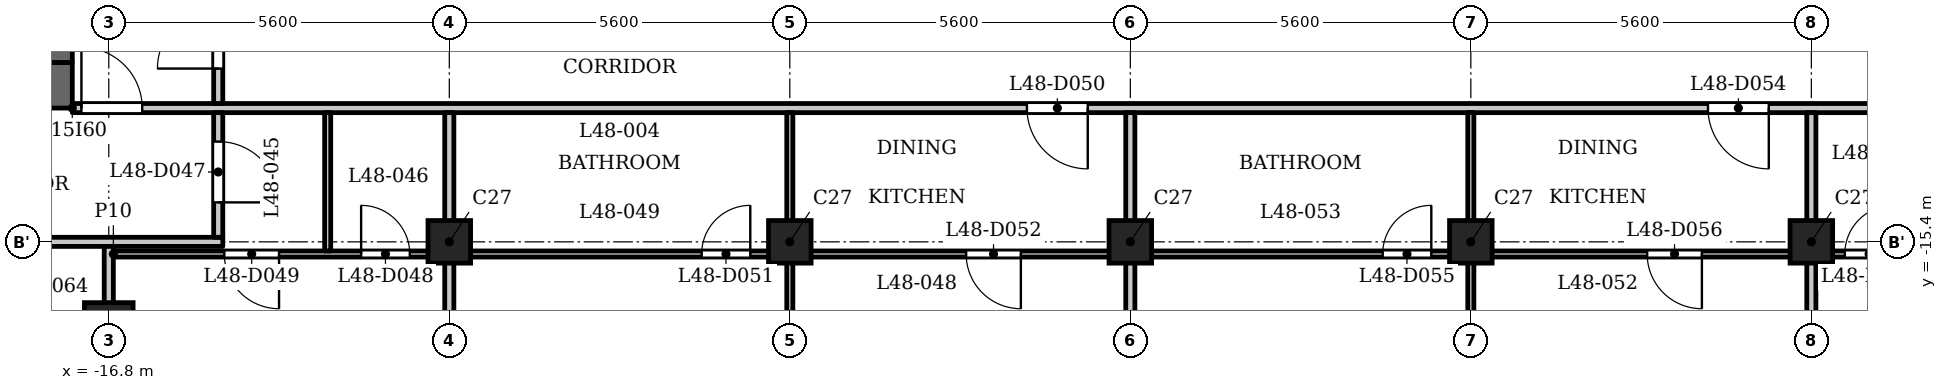
"""IFC4 building model, lengths in metres.
Left out: names, types, materials, properties, quantities, classifications, styles, units other than length and angle.
Written with IfcOpenShell. Run it as: python <this file> out.ifc"""

import sys

from ifc_helpers import new_model, si_unit, direction, frame, frame_2d, origin, origin_2d, place, context, subcontext, project, spatial, rectangle, extrude, element, fill, save


model = new_model("IFC4")
c1 = context("Model", 3, precision=1e-05, world=origin(), true_north=direction((0.0, 1.0)))
c2 = subcontext(c1, "Body", "Model", "MODEL_VIEW")
j1 = project(units=[si_unit("LENGTHUNIT", "METRE"), si_unit("PLANEANGLEUNIT", "RADIAN")], contexts=[c1])
p1 = place(None, origin())
s1 = spatial("IfcSite", under=j1, at=p1, CompositionType="ELEMENT")
p2 = place(p1, origin())
s2 = spatial("IfcBuilding", under=s1, at=p2, CompositionType="ELEMENT")
p3 = place(p2, frame((0.0, 0.0, 188.9)))
s3 = spatial("IfcBuildingStorey", under=s2, at=p3, CompositionType="ELEMENT", Elevation=188.9)
p4 = place(p3, frame((-16.8, -16.8, 0.0), z_axis=(0.0, 0.0, 1.0), x_axis=(1.0, 0.0, 0.0)))
e1 = element("IfcColumn", 1, at=p4, inside=s3, PredefinedType="COLUMN", context=c2, shape_type="SweptSolid", body=[
    extrude(rectangle(XDim=0.8, YDim=0.8, at=origin_2d()), origin(), (0.0, 0.0, 1.0), 3.5),
])
for number, where, z_axis, x_axis in (
    (2, (-11.2, -15.4, 0.0), (0.0, 0.0, 1.0), (1.0, 0.0, 0.0)),
    (3, (-5.6, -15.4, 0.0), (0.0, 0.0, 1.0), (1.0, 0.0, 0.0)),
    (4, (0.0, -15.4, 0.0), (0.0, 0.0, 1.0), (1.0, 0.0, 0.0)),
    (5, (5.6, -15.4, 0.0), (0.0, 0.0, 1.0), (1.0, 0.0, 0.0)),
    (6, (11.2, -15.4, 0.0), (0.0, 0.0, 1.0), (1.0, 0.0, 0.0)),
):
    element("IfcColumn", number, at=place(p3, frame(where, z_axis=z_axis, x_axis=x_axis)), inside=s3, PredefinedType="COLUMN", context=c2, shape_type="SweptSolid", body=[
        extrude(rectangle(XDim=0.7, YDim=0.7, at=origin_2d()), origin(), (0.0, 0.0, 1.0), 3.5),
    ])
p5 = place(p3, frame((-17.4, -12.825, 0.0), z_axis=(0.0, 0.0, 1.0), x_axis=(-1.0, 0.0, 0.0)))
e7 = element("IfcWall", 7, at=p5, inside=s3, PredefinedType="SHEAR", context=c2, shape_type="SweptSolid", body=[
    extrude(rectangle(XDim=7.6, YDim=0.75, at=frame_2d((3.8, 0.0))), origin(), (0.0, 0.0, 1.0), 3.2),
])
p6 = place(p3, frame((-17.6, -12.45, 0.0), z_axis=(0.0, 0.0, 1.0), x_axis=(0.0, 1.0, 0.0)))
e8 = element("IfcWall", 8, at=p6, inside=s3, PredefinedType="SHEAR", context=c2, shape_type="SweptSolid", body=[
    extrude(rectangle(XDim=24.9, YDim=0.4, at=frame_2d((12.45, 0.0))), origin(), (0.0, 0.0, 1.0), 3.2),
])
p7 = place(p6, frame((6.325, 0.0, 0.0)))
e9 = element("IfcOpeningElement", 9, at=p7, cuts=e8, PredefinedType="OPENING", context=c2, shape_type="SweptSolid", body=[
    extrude(rectangle(XDim=0.9, YDim=2.1, at=frame_2d((0.45, 1.05))), frame((0.0, 0.21, 0.0), z_axis=(0.0, -1.0, 0.0), x_axis=(1.0, 0.0, 0.0)), (0.0, 0.0, 1.0), 0.42),
])
p8 = place(p6, frame((9.925, 0.0, 0.0)))
e10 = element("IfcOpeningElement", 10, at=p8, cuts=e8, PredefinedType="OPENING", context=c2, shape_type="SweptSolid", body=[
    extrude(rectangle(XDim=0.9, YDim=2.1, at=frame_2d((0.45, 1.05))), frame((0.0, 0.21, 0.0), z_axis=(0.0, -1.0, 0.0), x_axis=(1.0, 0.0, 0.0)), (0.0, 0.0, 1.0), 0.42),
])
p9 = place(p6, frame((15.6, 0.0, 0.0)))
e11 = element("IfcOpeningElement", 11, at=p9, cuts=e8, PredefinedType="OPENING", context=c2, shape_type="SweptSolid", body=[
    extrude(rectangle(XDim=1.1, YDim=2.1, at=frame_2d((0.55, 1.05))), frame((0.0, 0.21, 0.0), z_axis=(0.0, -1.0, 0.0), x_axis=(1.0, 0.0, 0.0)), (0.0, 0.0, 1.0), 0.42),
])
p10 = place(p6, frame((18.0, 0.0, 0.0)))
e12 = element("IfcOpeningElement", 12, at=p10, cuts=e8, PredefinedType="OPENING", context=c2, shape_type="SweptSolid", body=[
    extrude(rectangle(XDim=1.1, YDim=2.1, at=frame_2d((0.55, 1.05))), frame((0.0, 0.21, 0.0), z_axis=(0.0, -1.0, 0.0), x_axis=(1.0, 0.0, 0.0)), (0.0, 0.0, 1.0), 0.42),
])
p11 = place(p6, frame((23.025, 0.0, 0.0)))
e13 = element("IfcOpeningElement", 13, at=p11, cuts=e8, PredefinedType="OPENING", context=c2, shape_type="SweptSolid", body=[
    extrude(rectangle(XDim=1.1, YDim=2.1, at=frame_2d((0.55, 1.05))), frame((0.0, 0.21, 0.0), z_axis=(0.0, -1.0, 0.0), x_axis=(1.0, 0.0, 0.0)), (0.0, 0.0, 1.0), 0.42),
])
p12 = place(p6, frame((0.775, 0.0, 0.0)))
e14 = element("IfcOpeningElement", 14, at=p12, cuts=e8, PredefinedType="OPENING", context=c2, shape_type="SweptSolid", body=[
    extrude(rectangle(XDim=1.1, YDim=2.1, at=frame_2d((0.55, 1.05))), frame((0.0, 0.21, 0.0), z_axis=(0.0, -1.0, 0.0), x_axis=(1.0, 0.0, 0.0)), (0.0, 0.0, 1.0), 0.42),
])
p13 = place(p6, frame((12.925, 0.0, 0.0)))
e15 = element("IfcOpeningElement", 15, at=p13, cuts=e8, PredefinedType="OPENING", context=c2, shape_type="SweptSolid", body=[
    extrude(rectangle(XDim=1.8, YDim=2.1, at=frame_2d((0.9, 1.05))), frame((0.0, 0.21, 0.0), z_axis=(0.0, -1.0, 0.0), x_axis=(1.0, 0.0, 0.0)), (0.0, 0.0, 1.0), 0.42),
])
p14 = place(p3, frame((-16.725, -15.6, 0.0), z_axis=(0.0, 0.0, 1.0), x_axis=(1.0, 0.0, 0.0)))
e16 = element("IfcWall", 16, at=p14, inside=s3, PredefinedType="PARTITIONING", context=c2, shape_type="SweptSolid", body=[
    extrude(rectangle(XDim=33.45, YDim=0.1, at=frame_2d((16.725, 0.0))), origin(), (0.0, 0.0, 1.0), 3.2),
])
p15 = place(p14, frame((4.075, 0.0, 0.0)))
e17 = element("IfcOpeningElement", 17, at=p15, cuts=e16, PredefinedType="OPENING", context=c2, shape_type="SweptSolid", body=[
    extrude(rectangle(XDim=0.8, YDim=2.1, at=frame_2d((0.4, 1.05))), frame((0.0, 0.06, 0.0), z_axis=(0.0, -1.0, 0.0), x_axis=(1.0, 0.0, 0.0)), (0.0, 0.0, 1.0), 0.12),
])
p16 = place(p14, frame((1.825, 0.0, 0.0)))
e18 = element("IfcOpeningElement", 18, at=p16, cuts=e16, PredefinedType="OPENING", context=c2, shape_type="SweptSolid", body=[
    extrude(rectangle(XDim=0.9, YDim=2.1, at=frame_2d((0.45, 1.05))), frame((0.0, 0.06, 0.0), z_axis=(0.0, -1.0, 0.0), x_axis=(1.0, 0.0, 0.0)), (0.0, 0.0, 1.0), 0.12),
])
p17 = place(p14, frame((9.675, 0.0, 0.0)))
e19 = element("IfcOpeningElement", 19, at=p17, cuts=e16, PredefinedType="OPENING", context=c2, shape_type="SweptSolid", body=[
    extrude(rectangle(XDim=0.8, YDim=2.1, at=frame_2d((0.4, 1.05))), frame((0.0, 0.06, 0.0), z_axis=(0.0, -1.0, 0.0), x_axis=(1.0, 0.0, 0.0)), (0.0, 0.0, 1.0), 0.12),
])
p18 = place(p14, frame((14.025, 0.0, 0.0)))
e20 = element("IfcOpeningElement", 20, at=p18, cuts=e16, PredefinedType="OPENING", context=c2, shape_type="SweptSolid", body=[
    extrude(rectangle(XDim=0.9, YDim=2.1, at=frame_2d((0.45, 1.05))), frame((0.0, 0.06, 0.0), z_axis=(0.0, -1.0, 0.0), x_axis=(1.0, 0.0, 0.0)), (0.0, 0.0, 1.0), 0.12),
])
p19 = place(p14, frame((20.875, 0.0, 0.0)))
e21 = element("IfcOpeningElement", 21, at=p19, cuts=e16, PredefinedType="OPENING", context=c2, shape_type="SweptSolid", body=[
    extrude(rectangle(XDim=0.8, YDim=2.1, at=frame_2d((0.4, 1.05))), frame((0.0, 0.06, 0.0), z_axis=(0.0, -1.0, 0.0), x_axis=(1.0, 0.0, 0.0)), (0.0, 0.0, 1.0), 0.12),
])
p20 = place(p14, frame((25.225, 0.0, 0.0)))
e22 = element("IfcOpeningElement", 22, at=p20, cuts=e16, PredefinedType="OPENING", context=c2, shape_type="SweptSolid", body=[
    extrude(rectangle(XDim=0.9, YDim=2.1, at=frame_2d((0.45, 1.05))), frame((0.0, 0.06, 0.0), z_axis=(0.0, -1.0, 0.0), x_axis=(1.0, 0.0, 0.0)), (0.0, 0.0, 1.0), 0.12),
])
p21 = place(p14, frame((28.475, 0.0, 0.0)))
e23 = element("IfcOpeningElement", 23, at=p21, cuts=e16, PredefinedType="OPENING", context=c2, shape_type="SweptSolid", body=[
    extrude(rectangle(XDim=0.8, YDim=2.1, at=frame_2d((0.4, 1.05))), frame((0.0, 0.06, 0.0), z_axis=(0.0, -1.0, 0.0), x_axis=(1.0, 0.0, 0.0)), (0.0, 0.0, 1.0), 0.12),
])
p22 = place(p14, frame((30.675, 0.0, 0.0)))
e24 = element("IfcOpeningElement", 24, at=p22, cuts=e16, PredefinedType="OPENING", context=c2, shape_type="SweptSolid", body=[
    extrude(rectangle(XDim=0.9, YDim=2.1, at=frame_2d((0.45, 1.05))), frame((0.0, 0.06, 0.0), z_axis=(0.0, -1.0, 0.0), x_axis=(1.0, 0.0, 0.0)), (0.0, 0.0, 1.0), 0.12),
])
p23 = place(p3, frame((-24.684, -15.4, 0.0), z_axis=(0.0, 0.0, 1.0), x_axis=(1.0, 0.0, 0.0)))
e25 = element("IfcWall", 25, at=p23, inside=s3, PredefinedType="PARTITIONING", context=c2, shape_type="SweptSolid", body=[
    extrude(rectangle(XDim=9.759, YDim=0.15, at=frame_2d((4.879, 0.0))), origin(), (0.0, 0.0, 1.0), 3.2),
])
p24 = place(p23, frame((1.143, 0.0, 0.0)))
e26 = element("IfcOpeningElement", 26, at=p24, cuts=e25, PredefinedType="OPENING", context=c2, shape_type="SweptSolid", body=[
    extrude(rectangle(XDim=1.0, YDim=2.1, at=frame_2d((0.5, 1.05))), frame((0.0, 0.085, 0.0), z_axis=(0.0, -1.0, 0.0), x_axis=(1.0, 0.0, 0.0)), (0.0, 0.0, 1.0), 0.17),
])
p25 = place(p3, frame((-17.4, -13.2, 0.0), z_axis=(0.0, 0.0, 1.0), x_axis=(1.0, 0.0, 0.0)))
e27 = element("IfcWall", 27, at=p25, inside=s3, PredefinedType="PARTITIONING", context=c2, shape_type="SweptSolid", body=[
    extrude(rectangle(XDim=34.8, YDim=0.15, at=frame_2d((17.4, 0.0))), origin(), (0.0, 0.0, 1.0), 3.2),
])
p26 = place(p25, frame((0.15, 0.0, 0.0)))
e28 = element("IfcOpeningElement", 28, at=p26, cuts=e27, PredefinedType="OPENING", context=c2, shape_type="SweptSolid", body=[
    extrude(rectangle(XDim=1.0, YDim=2.1, at=frame_2d((0.5, 1.05))), frame((0.0, 0.085, 0.0), z_axis=(0.0, -1.0, 0.0), x_axis=(1.0, 0.0, 0.0)), (0.0, 0.0, 1.0), 0.17),
])
p27 = place(p25, frame((33.55, 0.0, 0.0)))
e29 = element("IfcOpeningElement", 29, at=p27, cuts=e27, PredefinedType="OPENING", context=c2, shape_type="SweptSolid", body=[
    extrude(rectangle(XDim=1.0, YDim=2.1, at=frame_2d((0.5, 1.05))), frame((0.0, 0.085, 0.0), z_axis=(0.0, -1.0, 0.0), x_axis=(1.0, 0.0, 0.0)), (0.0, 0.0, 1.0), 0.17),
])
p28 = place(p25, frame((15.7, 0.0, 0.0)))
e30 = element("IfcOpeningElement", 30, at=p28, cuts=e27, PredefinedType="OPENING", context=c2, shape_type="SweptSolid", body=[
    extrude(rectangle(XDim=1.0, YDim=2.1, at=frame_2d((0.5, 1.05))), frame((0.0, 0.085, 0.0), z_axis=(0.0, -1.0, 0.0), x_axis=(1.0, 0.0, 0.0)), (0.0, 0.0, 1.0), 0.17),
])
p29 = place(p25, frame((26.9, 0.0, 0.0)))
e31 = element("IfcOpeningElement", 31, at=p29, cuts=e27, PredefinedType="OPENING", context=c2, shape_type="SweptSolid", body=[
    extrude(rectangle(XDim=1.0, YDim=2.1, at=frame_2d((0.5, 1.05))), frame((0.0, 0.085, 0.0), z_axis=(0.0, -1.0, 0.0), x_axis=(1.0, 0.0, 0.0)), (0.0, 0.0, 1.0), 0.17),
])
p30 = place(p3, frame((-16.8, -22.31, 0.0), z_axis=(0.0, 0.0, 1.0), x_axis=(0.0, 1.0, 0.0)))
e32 = element("IfcWall", 32, at=p30, inside=s3, PredefinedType="PARTITIONING", context=c2, shape_type="SweptSolid", body=[
    extrude(rectangle(XDim=6.835, YDim=0.15, at=frame_2d((3.417, 0.0))), origin(), (0.0, 0.0, 1.0), 2.55),
])
p31 = place(p3, frame((-15.0, -15.325, 0.0), z_axis=(0.0, 0.0, 1.0), x_axis=(0.0, 1.0, 0.0)))
e33 = element("IfcWall", 33, at=p31, inside=s3, PredefinedType="PARTITIONING", context=c2, shape_type="SweptSolid", body=[
    extrude(rectangle(XDim=2.05, YDim=0.15, at=frame_2d((1.025, 0.0))), origin(), (0.0, 0.0, 1.0), 3.2),
])
p32 = place(p31, frame((0.574, 0.0, 0.0)))
e34 = element("IfcOpeningElement", 34, at=p32, cuts=e33, PredefinedType="OPENING", context=c2, shape_type="SweptSolid", body=[
    extrude(rectangle(XDim=1.0, YDim=2.1, at=frame_2d((0.5, 1.05))), frame((0.0, 0.085, 0.0), z_axis=(0.0, -1.0, 0.0), x_axis=(1.0, 0.0, 0.0)), (0.0, 0.0, 1.0), 0.17),
])
p33 = place(p3, frame((-15.0, -13.125, 0.0), z_axis=(0.0, 0.0, 1.0), x_axis=(0.0, 1.0, 0.0)))
e35 = element("IfcWall", 35, at=p33, inside=s3, PredefinedType="PARTITIONING", context=c2, shape_type="SweptSolid", body=[
    extrude(rectangle(XDim=6.356, YDim=0.15, at=frame_2d((3.178, 0.0))), origin(), (0.0, 0.0, 1.0), 3.2),
])
p34 = place(p33, frame((0.575, 0.0, 0.0)))
e36 = element("IfcOpeningElement", 36, at=p34, cuts=e35, PredefinedType="OPENING", context=c2, shape_type="SweptSolid", body=[
    extrude(rectangle(XDim=1.0, YDim=2.1, at=frame_2d((0.5, 1.05))), frame((0.0, 0.085, 0.0), z_axis=(0.0, -1.0, 0.0), x_axis=(1.0, 0.0, 0.0)), (0.0, 0.0, 1.0), 0.17),
])
p35 = place(p3, frame((-13.2, -15.55, 0.0), z_axis=(0.0, 0.0, 1.0), x_axis=(0.0, 1.0, 0.0)))
e37 = element("IfcWall", 37, at=p35, inside=s3, PredefinedType="PARTITIONING", context=c2, shape_type="SweptSolid", body=[
    extrude(rectangle(XDim=2.275, YDim=0.1, at=frame_2d((1.138, 0.0))), origin(), (0.0, 0.0, 1.0), 3.2),
])
p36 = place(p3, frame((-11.2, -22.08, 0.0), z_axis=(0.0, 0.0, 1.0), x_axis=(0.0, 1.0, 0.0)))
e38 = element("IfcWall", 38, at=p36, inside=s3, PredefinedType="PARTITIONING", context=c2, shape_type="SweptSolid", body=[
    extrude(rectangle(XDim=6.43, YDim=0.15, at=frame_2d((3.215, 0.0))), origin(), (0.0, 0.0, 1.0), 3.2),
])
p37 = place(p3, frame((-11.2, -15.55, 0.0), z_axis=(0.0, 0.0, 1.0), x_axis=(0.0, 1.0, 0.0)))
e39 = element("IfcWall", 39, at=p37, inside=s3, PredefinedType="PARTITIONING", context=c2, shape_type="SweptSolid", body=[
    extrude(rectangle(XDim=2.275, YDim=0.15, at=frame_2d((1.138, 0.0))), origin(), (0.0, 0.0, 1.0), 3.2),
])
p38 = place(p3, frame((-5.6, -22.08, 0.0), z_axis=(0.0, 0.0, 1.0), x_axis=(0.0, 1.0, 0.0)))
e40 = element("IfcWall", 40, at=p38, inside=s3, PredefinedType="PARTITIONING", context=c2, shape_type="SweptSolid", body=[
    extrude(rectangle(XDim=6.43, YDim=0.1, at=frame_2d((3.215, 0.0))), origin(), (0.0, 0.0, 1.0), 3.2),
])
p39 = place(p38, frame((4.18, 0.0, 0.0)))
e41 = element("IfcOpeningElement", 41, at=p39, cuts=e40, PredefinedType="OPENING", context=c2, shape_type="SweptSolid", body=[
    extrude(rectangle(XDim=0.9, YDim=2.1, at=frame_2d((0.45, 1.05))), frame((0.0, 0.06, 0.0), z_axis=(0.0, -1.0, 0.0), x_axis=(1.0, 0.0, 0.0)), (0.0, 0.0, 1.0), 0.12),
])
p40 = place(p3, frame((-5.6, -15.55, 0.0), z_axis=(0.0, 0.0, 1.0), x_axis=(0.0, 1.0, 0.0)))
e42 = element("IfcWall", 42, at=p40, inside=s3, PredefinedType="PARTITIONING", context=c2, shape_type="SweptSolid", body=[
    extrude(rectangle(XDim=2.275, YDim=0.1, at=frame_2d((1.138, 0.0))), origin(), (0.0, 0.0, 1.0), 3.2),
])
p41 = place(p3, frame((0.0, -22.08, 0.0), z_axis=(0.0, 0.0, 1.0), x_axis=(0.0, 1.0, 0.0)))
e43 = element("IfcWall", 43, at=p41, inside=s3, PredefinedType="PARTITIONING", context=c2, shape_type="SweptSolid", body=[
    extrude(rectangle(XDim=6.43, YDim=0.15, at=frame_2d((3.215, 0.0))), origin(), (0.0, 0.0, 1.0), 3.2),
])
p42 = place(p3, frame((0.0, -15.55, 0.0), z_axis=(0.0, 0.0, 1.0), x_axis=(0.0, 1.0, 0.0)))
e44 = element("IfcWall", 44, at=p42, inside=s3, PredefinedType="PARTITIONING", context=c2, shape_type="SweptSolid", body=[
    extrude(rectangle(XDim=2.275, YDim=0.15, at=frame_2d((1.138, 0.0))), origin(), (0.0, 0.0, 1.0), 3.2),
])
p43 = place(p3, frame((5.6, -22.08, 0.0), z_axis=(0.0, 0.0, 1.0), x_axis=(0.0, 1.0, 0.0)))
e45 = element("IfcWall", 45, at=p43, inside=s3, PredefinedType="PARTITIONING", context=c2, shape_type="SweptSolid", body=[
    extrude(rectangle(XDim=6.43, YDim=0.1, at=frame_2d((3.215, 0.0))), origin(), (0.0, 0.0, 1.0), 3.2),
])
p44 = place(p43, frame((4.18, 0.0, 0.0)))
e46 = element("IfcOpeningElement", 46, at=p44, cuts=e45, PredefinedType="OPENING", context=c2, shape_type="SweptSolid", body=[
    extrude(rectangle(XDim=0.9, YDim=2.1, at=frame_2d((0.45, 1.05))), frame((0.0, 0.06, 0.0), z_axis=(0.0, -1.0, 0.0), x_axis=(1.0, 0.0, 0.0)), (0.0, 0.0, 1.0), 0.12),
])
p45 = place(p3, frame((5.6, -15.55, 0.0), z_axis=(0.0, 0.0, 1.0), x_axis=(0.0, 1.0, 0.0)))
e47 = element("IfcWall", 47, at=p45, inside=s3, PredefinedType="PARTITIONING", context=c2, shape_type="SweptSolid", body=[
    extrude(rectangle(XDim=2.275, YDim=0.1, at=frame_2d((1.138, 0.0))), origin(), (0.0, 0.0, 1.0), 3.2),
])
p46 = place(p3, frame((11.2, -22.08, 0.0), z_axis=(0.0, 0.0, 1.0), x_axis=(0.0, 1.0, 0.0)))
e48 = element("IfcWall", 48, at=p46, inside=s3, PredefinedType="PARTITIONING", context=c2, shape_type="SweptSolid", body=[
    extrude(rectangle(XDim=6.43, YDim=0.15, at=frame_2d((3.215, 0.0))), origin(), (0.0, 0.0, 1.0), 3.2),
])
p47 = place(p3, frame((11.2, -15.55, 0.0), z_axis=(0.0, 0.0, 1.0), x_axis=(0.0, 1.0, 0.0)))
e49 = element("IfcWall", 49, at=p47, inside=s3, PredefinedType="PARTITIONING", context=c2, shape_type="SweptSolid", body=[
    extrude(rectangle(XDim=2.275, YDim=0.15, at=frame_2d((1.138, 0.0))), origin(), (0.0, 0.0, 1.0), 3.2),
])
p48 = place(p34, origin())
e50 = element("IfcDoor", 50, at=p48, inside=s3, OperationType="SINGLE_SWING_RIGHT", PredefinedType="DOOR", context=c2, shape_type="SweptSolid", body=[
    extrude(rectangle(XDim=1.0, YDim=2.1, at=frame_2d((0.5, 1.05))), frame((0.0, 0.025, 0.0), z_axis=(0.0, -1.0, 0.0), x_axis=(1.0, 0.0, 0.0)), (0.0, 0.0, 1.0), 0.05),
])
fill(e36, e50)
p49 = place(p26, origin())
e51 = element("IfcDoor", 51, at=p49, inside=s3, OperationType="SINGLE_SWING_RIGHT", PredefinedType="DOOR", context=c2, shape_type="SweptSolid", body=[
    extrude(rectangle(XDim=1.0, YDim=2.1, at=frame_2d((0.5, 1.05))), frame((0.0, 0.025, 0.0), z_axis=(0.0, -1.0, 0.0), x_axis=(1.0, 0.0, 0.0)), (0.0, 0.0, 1.0), 0.05),
])
fill(e28, e51)
p50 = place(p32, origin())
e52 = element("IfcDoor", 52, at=p50, inside=s3, OperationType="SINGLE_SWING_LEFT", PredefinedType="DOOR", context=c2, shape_type="SweptSolid", body=[
    extrude(rectangle(XDim=1.0, YDim=2.1, at=frame_2d((0.5, 1.05))), frame((0.0, 0.025, 0.0), z_axis=(0.0, -1.0, 0.0), x_axis=(1.0, 0.0, 0.0)), (0.0, 0.0, 1.0), 0.05),
])
fill(e34, e52)
p51 = place(p15, origin())
e53 = element("IfcDoor", 53, at=p51, inside=s3, OperationType="SINGLE_SWING_RIGHT", PredefinedType="DOOR", context=c2, shape_type="SweptSolid", body=[
    extrude(rectangle(XDim=0.8, YDim=2.1, at=frame_2d((0.4, 1.05))), frame((0.0, 0.025, 0.0), z_axis=(0.0, -1.0, 0.0), x_axis=(1.0, 0.0, 0.0)), (0.0, 0.0, 1.0), 0.05),
])
fill(e17, e53)
p52 = place(p16, origin())
e54 = element("IfcDoor", 54, at=p52, inside=s3, OperationType="SINGLE_SWING_RIGHT", PredefinedType="DOOR", context=c2, shape_type="SweptSolid", body=[
    extrude(rectangle(XDim=0.9, YDim=2.1, at=frame_2d((0.45, 1.05))), frame((0.0, 0.025, 0.0), z_axis=(0.0, -1.0, 0.0), x_axis=(1.0, 0.0, 0.0)), (0.0, 0.0, 1.0), 0.05),
])
fill(e18, e54)
p53 = place(p28, origin())
e55 = element("IfcDoor", 55, at=p53, inside=s3, OperationType="SINGLE_SWING_RIGHT", PredefinedType="DOOR", context=c2, shape_type="SweptSolid", body=[
    extrude(rectangle(XDim=1.0, YDim=2.1, at=frame_2d((0.5, 1.05))), frame((0.0, 0.025, 0.0), z_axis=(0.0, -1.0, 0.0), x_axis=(1.0, 0.0, 0.0)), (0.0, 0.0, 1.0), 0.05),
])
fill(e30, e55)
p54 = place(p17, origin())
e56 = element("IfcDoor", 56, at=p54, inside=s3, OperationType="SINGLE_SWING_LEFT", PredefinedType="DOOR", context=c2, shape_type="SweptSolid", body=[
    extrude(rectangle(XDim=0.8, YDim=2.1, at=frame_2d((0.4, 1.05))), frame((0.0, 0.025, 0.0), z_axis=(0.0, -1.0, 0.0), x_axis=(1.0, 0.0, 0.0)), (0.0, 0.0, 1.0), 0.05),
])
fill(e19, e56)
p55 = place(p18, origin())
e57 = element("IfcDoor", 57, at=p55, inside=s3, OperationType="SINGLE_SWING_RIGHT", PredefinedType="DOOR", context=c2, shape_type="SweptSolid", body=[
    extrude(rectangle(XDim=0.9, YDim=2.1, at=frame_2d((0.45, 1.05))), frame((0.0, 0.025, 0.0), z_axis=(0.0, -1.0, 0.0), x_axis=(1.0, 0.0, 0.0)), (0.0, 0.0, 1.0), 0.05),
])
fill(e20, e57)
p56 = place(p29, origin())
e58 = element("IfcDoor", 58, at=p56, inside=s3, OperationType="SINGLE_SWING_RIGHT", PredefinedType="DOOR", context=c2, shape_type="SweptSolid", body=[
    extrude(rectangle(XDim=1.0, YDim=2.1, at=frame_2d((0.5, 1.05))), frame((0.0, 0.025, 0.0), z_axis=(0.0, -1.0, 0.0), x_axis=(1.0, 0.0, 0.0)), (0.0, 0.0, 1.0), 0.05),
])
fill(e31, e58)
p57 = place(p19, origin())
e59 = element("IfcDoor", 59, at=p57, inside=s3, OperationType="SINGLE_SWING_LEFT", PredefinedType="DOOR", context=c2, shape_type="SweptSolid", body=[
    extrude(rectangle(XDim=0.8, YDim=2.1, at=frame_2d((0.4, 1.05))), frame((0.0, 0.025, 0.0), z_axis=(0.0, -1.0, 0.0), x_axis=(1.0, 0.0, 0.0)), (0.0, 0.0, 1.0), 0.05),
])
fill(e21, e59)
p58 = place(p20, origin())
e60 = element("IfcDoor", 60, at=p58, inside=s3, OperationType="SINGLE_SWING_RIGHT", PredefinedType="DOOR", context=c2, shape_type="SweptSolid", body=[
    extrude(rectangle(XDim=0.9, YDim=2.1, at=frame_2d((0.45, 1.05))), frame((0.0, 0.025, 0.0), z_axis=(0.0, -1.0, 0.0), x_axis=(1.0, 0.0, 0.0)), (0.0, 0.0, 1.0), 0.05),
])
fill(e22, e60)
p59 = place(p21, origin())
e61 = element("IfcDoor", 61, at=p59, inside=s3, OperationType="SINGLE_SWING_LEFT", PredefinedType="DOOR", context=c2, shape_type="SweptSolid", body=[
    extrude(rectangle(XDim=0.8, YDim=2.1, at=frame_2d((0.4, 1.05))), frame((0.0, 0.025, 0.0), z_axis=(0.0, -1.0, 0.0), x_axis=(1.0, 0.0, 0.0)), (0.0, 0.0, 1.0), 0.05),
])
fill(e23, e61)
save(model, sys.argv[1])
